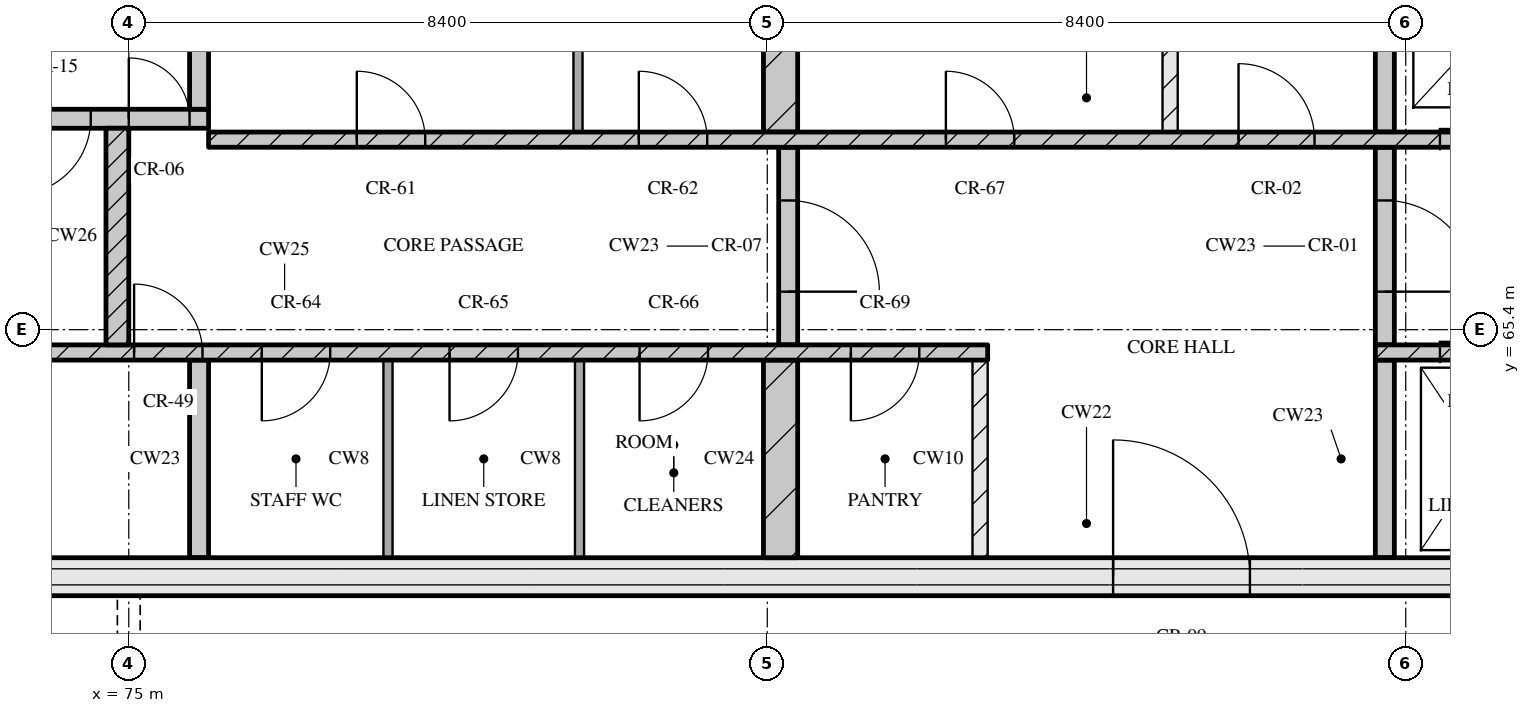
"""IFC4 building model, lengths in metres.
Left out: names, types, materials, properties, quantities, classifications, styles, units other than length and angle.
Written with IfcOpenShell. Run it as: python <this file> out.ifc"""

import sys

from ifc_helpers import new_model, si_unit, direction, frame, frame_2d, origin, place, context, subcontext, project, spatial, rectangle, extrude, element, fill, save


model = new_model("IFC4")
c1 = context("Model", 3, precision=1e-05, world=origin(), true_north=direction((0.0, 1.0)))
c2 = subcontext(c1, "Body", "Model", "MODEL_VIEW")
j1 = project(units=[si_unit("LENGTHUNIT", "METRE"), si_unit("PLANEANGLEUNIT", "RADIAN")], contexts=[c1])
p1 = place(None, origin())
s1 = spatial("IfcSite", under=j1, at=p1, CompositionType="ELEMENT")
p2 = place(p1, origin())
s2 = spatial("IfcBuilding", under=s1, at=p2, CompositionType="ELEMENT")
p3 = place(p2, frame((0.0, 0.0, 295.95)))
s3 = spatial("IfcBuildingStorey", under=s2, at=p3, CompositionType="ELEMENT", Elevation=295.95)
p4 = place(p3, frame((67.3, 62.15, 0.0), z_axis=(0.0, 0.0, 1.0), x_axis=(1.0, 0.0, 0.0)))
e1 = element("IfcWall", 1, at=p4, inside=s3, PredefinedType="SOLIDWALL", context=c2, shape_type="SweptSolid", body=[
    extrude(rectangle(XDim=40.6, YDim=0.5, at=frame_2d((20.3, 0.0))), origin(), (0.0, 0.0, 1.0), 3.32),
])
p5 = place(p4, frame((20.65, 0.0, 0.0)))
e2 = element("IfcOpeningElement", 2, at=p5, cuts=e1, PredefinedType="OPENING", context=c2, shape_type="SweptSolid", body=[
    extrude(rectangle(XDim=1.8, YDim=2.1, at=frame_2d((0.9, 1.05))), frame((0.0, 0.26, 0.0), z_axis=(0.0, -1.0, 0.0), x_axis=(1.0, 0.0, 0.0)), (0.0, 0.0, 1.0), 0.52),
])
p6 = place(p3, frame((75.925, 62.4, 0.0), z_axis=(0.0, 0.0, 1.0), x_axis=(0.0, 1.0, 0.0)))
e3 = element("IfcWall", 3, at=p6, inside=s3, PredefinedType="SOLIDWALL", context=c2, shape_type="SweptSolid", body=[
    extrude(rectangle(XDim=2.6, YDim=0.25, at=frame_2d((1.3, 0.0))), origin(), (0.0, 0.0, 1.0), 3.32),
])
for number, where, z_axis, x_axis in (
    (4, (78.41, 62.4, 0.0), (0.0, 0.0, 1.0), (0.0, 1.0, 0.0)),
    (5, (80.93, 62.4, 0.0), (0.0, 0.0, 1.0), (0.0, 1.0, 0.0)),
):
    element("IfcWall", number, at=place(p3, frame(where, z_axis=z_axis, x_axis=x_axis)), inside=s3, PredefinedType="PARTITIONING", context=c2, shape_type="SweptSolid", body=[
        extrude(rectangle(XDim=2.6, YDim=0.12, at=frame_2d((1.3, 0.0))), origin(), (0.0, 0.0, 1.0), 3.32),
    ])
p7 = place(p3, frame((83.575, 62.4, 0.0), z_axis=(0.0, 0.0, 1.0), x_axis=(0.0, 1.0, 0.0)))
e6 = element("IfcWall", 6, at=p7, inside=s3, PredefinedType="SOLIDWALL", context=c2, shape_type="SweptSolid", body=[
    extrude(rectangle(XDim=2.6, YDim=0.45, at=frame_2d((1.3, 0.0))), origin(), (0.0, 0.0, 1.0), 3.32),
])
p8 = place(p3, frame((86.2, 62.4, 0.0), z_axis=(0.0, 0.0, 1.0), x_axis=(0.0, 1.0, 0.0)))
e7 = element("IfcWall", 7, at=p8, inside=s3, PredefinedType="PARTITIONING", context=c2, shape_type="SweptSolid", body=[
    extrude(rectangle(XDim=2.6, YDim=0.2, at=frame_2d((1.3, 0.0))), origin(), (0.0, 0.0, 1.0), 3.32),
])
p9 = place(p3, frame((91.525, 62.4, 0.0), z_axis=(0.0, 0.0, 1.0), x_axis=(0.0, 1.0, 0.0)))
e8 = element("IfcWall", 8, at=p9, inside=s3, PredefinedType="SOLIDWALL", context=c2, shape_type="SweptSolid", body=[
    extrude(rectangle(XDim=2.6, YDim=0.25, at=frame_2d((1.3, 0.0))), origin(), (0.0, 0.0, 1.0), 3.32),
])
p10 = place(p3, frame((67.8, 65.1, 0.0), z_axis=(0.0, 0.0, 1.0), x_axis=(1.0, 0.0, 0.0)))
e9 = element("IfcWall", 9, at=p10, inside=s3, PredefinedType="SOLIDWALL", context=c2, shape_type="SweptSolid", body=[
    extrude(rectangle(XDim=18.5, YDim=0.2, at=frame_2d((9.25, 0.0))), origin(), (0.0, 0.0, 1.0), 3.32),
])
p11 = place(p10, frame((7.27, 0.0, 0.0)))
e10 = element("IfcOpeningElement", 10, at=p11, cuts=e9, PredefinedType="OPENING", context=c2, shape_type="SweptSolid", body=[
    extrude(rectangle(XDim=0.9, YDim=2.1, at=frame_2d((0.45, 1.05))), frame((0.0, 0.11, 0.0), z_axis=(0.0, -1.0, 0.0), x_axis=(1.0, 0.0, 0.0)), (0.0, 0.0, 1.0), 0.22),
])
p12 = place(p10, frame((8.95, 0.0, 0.0)))
e11 = element("IfcOpeningElement", 11, at=p12, cuts=e9, PredefinedType="OPENING", context=c2, shape_type="SweptSolid", body=[
    extrude(rectangle(XDim=0.9, YDim=2.1, at=frame_2d((0.45, 1.05))), frame((0.0, 0.11, 0.0), z_axis=(0.0, -1.0, 0.0), x_axis=(1.0, 0.0, 0.0)), (0.0, 0.0, 1.0), 0.22),
])
p13 = place(p10, frame((11.42, 0.0, 0.0)))
e12 = element("IfcOpeningElement", 12, at=p13, cuts=e9, PredefinedType="OPENING", context=c2, shape_type="SweptSolid", body=[
    extrude(rectangle(XDim=0.9, YDim=2.1, at=frame_2d((0.45, 1.05))), frame((0.0, 0.11, 0.0), z_axis=(0.0, -1.0, 0.0), x_axis=(1.0, 0.0, 0.0)), (0.0, 0.0, 1.0), 0.22),
])
p14 = place(p10, frame((13.92, 0.0, 0.0)))
e13 = element("IfcOpeningElement", 13, at=p14, cuts=e9, PredefinedType="OPENING", context=c2, shape_type="SweptSolid", body=[
    extrude(rectangle(XDim=0.9, YDim=2.1, at=frame_2d((0.45, 1.05))), frame((0.0, 0.11, 0.0), z_axis=(0.0, -1.0, 0.0), x_axis=(1.0, 0.0, 0.0)), (0.0, 0.0, 1.0), 0.22),
])
p15 = place(p10, frame((16.7, 0.0, 0.0)))
e14 = element("IfcOpeningElement", 14, at=p15, cuts=e9, PredefinedType="OPENING", context=c2, shape_type="SweptSolid", body=[
    extrude(rectangle(XDim=0.9, YDim=2.1, at=frame_2d((0.45, 1.05))), frame((0.0, 0.11, 0.0), z_axis=(0.0, -1.0, 0.0), x_axis=(1.0, 0.0, 0.0)), (0.0, 0.0, 1.0), 0.22),
])
p16 = place(p3, frame((91.4, 65.1, 0.0), z_axis=(0.0, 0.0, 1.0), x_axis=(1.0, 0.0, 0.0)))
e15 = element("IfcWall", 15, at=p16, inside=s3, PredefinedType="SOLIDWALL", context=c2, shape_type="SweptSolid", body=[
    extrude(rectangle(XDim=16.0, YDim=0.2, at=frame_2d((8.0, 0.0))), origin(), (0.0, 0.0, 1.0), 3.32),
])
p17 = place(p16, frame((0.85, 0.0, 0.0)))
e16 = element("IfcOpeningElement", 16, at=p17, cuts=e15, PredefinedType="OPENING", context=c2, shape_type="SweptSolid", body=[
    extrude(rectangle(XDim=1.1, YDim=2.1, at=frame_2d((0.55, 1.05))), frame((0.0, 0.11, 0.0), z_axis=(0.0, -1.0, 0.0), x_axis=(1.0, 0.0, 0.0)), (0.0, 0.0, 1.0), 0.22),
])
p18 = place(p16, frame((3.35, 0.0, 0.0)))
e17 = element("IfcOpeningElement", 17, at=p18, cuts=e15, PredefinedType="OPENING", context=c2, shape_type="SweptSolid", body=[
    extrude(rectangle(XDim=1.1, YDim=2.1, at=frame_2d((0.55, 1.05))), frame((0.0, 0.11, 0.0), z_axis=(0.0, -1.0, 0.0), x_axis=(1.0, 0.0, 0.0)), (0.0, 0.0, 1.0), 0.22),
])
p19 = place(p16, frame((5.85, 0.0, 0.0)))
e18 = element("IfcOpeningElement", 18, at=p19, cuts=e15, PredefinedType="OPENING", context=c2, shape_type="SweptSolid", body=[
    extrude(rectangle(XDim=1.1, YDim=2.1, at=frame_2d((0.55, 1.05))), frame((0.0, 0.11, 0.0), z_axis=(0.0, -1.0, 0.0), x_axis=(1.0, 0.0, 0.0)), (0.0, 0.0, 1.0), 0.22),
])
p20 = place(p16, frame((7.83, 0.0, 0.0)))
e19 = element("IfcOpeningElement", 19, at=p20, cuts=e15, PredefinedType="OPENING", context=c2, shape_type="SweptSolid", body=[
    extrude(rectangle(XDim=0.9, YDim=2.1, at=frame_2d((0.45, 1.05))), frame((0.0, 0.11, 0.0), z_axis=(0.0, -1.0, 0.0), x_axis=(1.0, 0.0, 0.0)), (0.0, 0.0, 1.0), 0.22),
])
p21 = place(p3, frame((74.85, 65.2, 0.0), z_axis=(0.0, 0.0, 1.0), x_axis=(0.0, 1.0, 0.0)))
e20 = element("IfcWall", 20, at=p21, inside=s3, PredefinedType="SOLIDWALL", context=c2, shape_type="SweptSolid", body=[
    extrude(rectangle(XDim=2.85, YDim=0.3, at=frame_2d((1.425, 0.0))), origin(), (0.0, 0.0, 1.0), 3.32),
])
p22 = place(p3, frame((83.675, 65.2, 0.0), z_axis=(0.0, 0.0, 1.0), x_axis=(0.0, 1.0, 0.0)))
e21 = element("IfcWall", 21, at=p22, inside=s3, PredefinedType="SOLIDWALL", context=c2, shape_type="SweptSolid", body=[
    extrude(rectangle(XDim=2.6, YDim=0.25, at=frame_2d((1.3, 0.0))), origin(), (0.0, 0.0, 1.0), 3.32),
])
p23 = place(p22, frame((0.7, 0.0, 0.0)))
e22 = element("IfcOpeningElement", 22, at=p23, cuts=e21, PredefinedType="OPENING", context=c2, shape_type="SweptSolid", body=[
    extrude(rectangle(XDim=1.2, YDim=2.1, at=frame_2d((0.6, 1.05))), frame((0.0, 0.135, 0.0), z_axis=(0.0, -1.0, 0.0), x_axis=(1.0, 0.0, 0.0)), (0.0, 0.0, 1.0), 0.27),
])
p24 = place(p3, frame((91.525, 65.2, 0.0), z_axis=(0.0, 0.0, 1.0), x_axis=(0.0, 1.0, 0.0)))
e23 = element("IfcWall", 23, at=p24, inside=s3, PredefinedType="SOLIDWALL", context=c2, shape_type="SweptSolid", body=[
    extrude(rectangle(XDim=2.6, YDim=0.25, at=frame_2d((1.3, 0.0))), origin(), (0.0, 0.0, 1.0), 3.32),
])
p25 = place(p24, frame((0.7, 0.0, 0.0)))
e24 = element("IfcOpeningElement", 24, at=p25, cuts=e23, PredefinedType="OPENING", context=c2, shape_type="SweptSolid", body=[
    extrude(rectangle(XDim=1.2, YDim=2.1, at=frame_2d((0.6, 1.05))), frame((0.0, 0.135, 0.0), z_axis=(0.0, -1.0, 0.0), x_axis=(1.0, 0.0, 0.0)), (0.0, 0.0, 1.0), 0.27),
])
p26 = place(p3, frame((76.05, 67.9, 0.0), z_axis=(0.0, 0.0, 1.0), x_axis=(1.0, 0.0, 0.0)))
e25 = element("IfcWall", 25, at=p26, inside=s3, PredefinedType="SOLIDWALL", context=c2, shape_type="SweptSolid", body=[
    extrude(rectangle(XDim=23.1, YDim=0.2, at=frame_2d((11.55, 0.0))), origin(), (0.0, 0.0, 1.0), 3.32),
])
p27 = place(p26, frame((1.95, 0.0, 0.0)))
e26 = element("IfcOpeningElement", 26, at=p27, cuts=e25, PredefinedType="OPENING", context=c2, shape_type="SweptSolid", body=[
    extrude(rectangle(XDim=0.9, YDim=2.1, at=frame_2d((0.45, 1.05))), frame((0.0, 0.11, 0.0), z_axis=(0.0, -1.0, 0.0), x_axis=(1.0, 0.0, 0.0)), (0.0, 0.0, 1.0), 0.22),
])
p28 = place(p26, frame((5.66, 0.0, 0.0)))
e27 = element("IfcOpeningElement", 27, at=p28, cuts=e25, PredefinedType="OPENING", context=c2, shape_type="SweptSolid", body=[
    extrude(rectangle(XDim=0.9, YDim=2.1, at=frame_2d((0.45, 1.05))), frame((0.0, 0.11, 0.0), z_axis=(0.0, -1.0, 0.0), x_axis=(1.0, 0.0, 0.0)), (0.0, 0.0, 1.0), 0.22),
])
p29 = place(p26, frame((9.7, 0.0, 0.0)))
e28 = element("IfcOpeningElement", 28, at=p29, cuts=e25, PredefinedType="OPENING", context=c2, shape_type="SweptSolid", body=[
    extrude(rectangle(XDim=0.9, YDim=2.1, at=frame_2d((0.45, 1.05))), frame((0.0, 0.11, 0.0), z_axis=(0.0, -1.0, 0.0), x_axis=(1.0, 0.0, 0.0)), (0.0, 0.0, 1.0), 0.22),
])
p30 = place(p26, frame((13.55, 0.0, 0.0)))
e29 = element("IfcOpeningElement", 29, at=p30, cuts=e25, PredefinedType="OPENING", context=c2, shape_type="SweptSolid", body=[
    extrude(rectangle(XDim=1.0, YDim=2.1, at=frame_2d((0.5, 1.05))), frame((0.0, 0.11, 0.0), z_axis=(0.0, -1.0, 0.0), x_axis=(1.0, 0.0, 0.0)), (0.0, 0.0, 1.0), 0.22),
])
p31 = place(p26, frame((16.2, 0.0, 0.0)))
e30 = element("IfcOpeningElement", 30, at=p31, cuts=e25, PredefinedType="OPENING", context=c2, shape_type="SweptSolid", body=[
    extrude(rectangle(XDim=1.1, YDim=2.1, at=frame_2d((0.55, 1.05))), frame((0.0, 0.11, 0.0), z_axis=(0.0, -1.0, 0.0), x_axis=(1.0, 0.0, 0.0)), (0.0, 0.0, 1.0), 0.22),
])
p32 = place(p26, frame((18.7, 0.0, 0.0)))
e31 = element("IfcOpeningElement", 31, at=p32, cuts=e25, PredefinedType="OPENING", context=c2, shape_type="SweptSolid", body=[
    extrude(rectangle(XDim=1.1, YDim=2.1, at=frame_2d((0.55, 1.05))), frame((0.0, 0.11, 0.0), z_axis=(0.0, -1.0, 0.0), x_axis=(1.0, 0.0, 0.0)), (0.0, 0.0, 1.0), 0.22),
])
p33 = place(p26, frame((21.2, 0.0, 0.0)))
e32 = element("IfcOpeningElement", 32, at=p33, cuts=e25, PredefinedType="OPENING", context=c2, shape_type="SweptSolid", body=[
    extrude(rectangle(XDim=1.1, YDim=2.1, at=frame_2d((0.55, 1.05))), frame((0.0, 0.11, 0.0), z_axis=(0.0, -1.0, 0.0), x_axis=(1.0, 0.0, 0.0)), (0.0, 0.0, 1.0), 0.22),
])
p34 = place(p3, frame((80.91, 68.0, 0.0), z_axis=(0.0, 0.0, 1.0), x_axis=(0.0, 1.0, 0.0)))
e33 = element("IfcWall", 33, at=p34, inside=s3, PredefinedType="PARTITIONING", context=c2, shape_type="SweptSolid", body=[
    extrude(rectangle(XDim=2.6, YDim=0.12, at=frame_2d((1.3, 0.0))), origin(), (0.0, 0.0, 1.0), 3.32),
])
p35 = place(p3, frame((83.575, 68.0, 0.0), z_axis=(0.0, 0.0, 1.0), x_axis=(0.0, 1.0, 0.0)))
e34 = element("IfcWall", 34, at=p35, inside=s3, PredefinedType="SOLIDWALL", context=c2, shape_type="SweptSolid", body=[
    extrude(rectangle(XDim=2.6, YDim=0.45, at=frame_2d((1.3, 0.0))), origin(), (0.0, 0.0, 1.0), 3.32),
])
p36 = place(p3, frame((88.7, 68.0, 0.0), z_axis=(0.0, 0.0, 1.0), x_axis=(0.0, 1.0, 0.0)))
e35 = element("IfcWall", 35, at=p36, inside=s3, PredefinedType="PARTITIONING", context=c2, shape_type="SweptSolid", body=[
    extrude(rectangle(XDim=2.6, YDim=0.2, at=frame_2d((1.3, 0.0))), origin(), (0.0, 0.0, 1.0), 3.32),
])
p37 = place(p3, frame((91.525, 68.0, 0.0), z_axis=(0.0, 0.0, 1.0), x_axis=(0.0, 1.0, 0.0)))
e36 = element("IfcWall", 36, at=p37, inside=s3, PredefinedType="SOLIDWALL", context=c2, shape_type="SweptSolid", body=[
    extrude(rectangle(XDim=2.6, YDim=0.25, at=frame_2d((1.3, 0.0))), origin(), (0.0, 0.0, 1.0), 3.32),
])
p38 = place(p3, frame((67.8, 68.175, 0.0), z_axis=(0.0, 0.0, 1.0), x_axis=(1.0, 0.0, 0.0)))
e37 = element("IfcWall", 37, at=p38, inside=s3, PredefinedType="SOLIDWALL", context=c2, shape_type="SweptSolid", body=[
    extrude(rectangle(XDim=8.25, YDim=0.25, at=frame_2d((4.125, 0.0))), origin(), (0.0, 0.0, 1.0), 3.32),
])
p39 = place(p38, frame((5.7, 0.0, 0.0)))
e38 = element("IfcOpeningElement", 38, at=p39, cuts=e37, PredefinedType="OPENING", context=c2, shape_type="SweptSolid", body=[
    extrude(rectangle(XDim=1.0, YDim=2.1, at=frame_2d((0.5, 1.05))), frame((0.0, 0.135, 0.0), z_axis=(0.0, -1.0, 0.0), x_axis=(1.0, 0.0, 0.0)), (0.0, 0.0, 1.0), 0.27),
])
p40 = place(p38, frame((7.2, 0.0, 0.0)))
e39 = element("IfcOpeningElement", 39, at=p40, cuts=e37, PredefinedType="OPENING", context=c2, shape_type="SweptSolid", body=[
    extrude(rectangle(XDim=0.8, YDim=2.1, at=frame_2d((0.4, 1.05))), frame((0.0, 0.135, 0.0), z_axis=(0.0, -1.0, 0.0), x_axis=(1.0, 0.0, 0.0)), (0.0, 0.0, 1.0), 0.27),
])
p41 = place(p3, frame((75.925, 68.3, 0.0), z_axis=(0.0, 0.0, 1.0), x_axis=(0.0, 1.0, 0.0)))
e40 = element("IfcWall", 40, at=p41, inside=s3, PredefinedType="SOLIDWALL", context=c2, shape_type="SweptSolid", body=[
    extrude(rectangle(XDim=2.3, YDim=0.25, at=frame_2d((1.15, 0.0))), origin(), (0.0, 0.0, 1.0), 3.32),
])
p42 = place(p5, origin())
e41 = element("IfcDoor", 41, at=p42, inside=s3, OperationType="DOUBLE_DOOR_SINGLE_SWING", PredefinedType="DOOR", context=c2, shape_type="SweptSolid", body=[
    extrude(rectangle(XDim=1.8, YDim=2.1, at=frame_2d((0.9, 1.05))), frame((0.0, 0.025, 0.0), z_axis=(0.0, -1.0, 0.0), x_axis=(1.0, 0.0, 0.0)), (0.0, 0.0, 1.0), 0.05),
])
fill(e2, e41)
p43 = place(p11, origin())
e42 = element("IfcDoor", 42, at=p43, inside=s3, OperationType="SINGLE_SWING_LEFT", PredefinedType="DOOR", context=c2, shape_type="SweptSolid", body=[
    extrude(rectangle(XDim=0.9, YDim=2.1, at=frame_2d((0.45, 1.05))), frame((0.0, 0.025, 0.0), z_axis=(0.0, -1.0, 0.0), x_axis=(1.0, 0.0, 0.0)), (0.0, 0.0, 1.0), 0.05),
])
fill(e10, e42)
p44 = place(p12, origin())
e43 = element("IfcDoor", 43, at=p44, inside=s3, OperationType="SINGLE_SWING_RIGHT", PredefinedType="DOOR", context=c2, shape_type="SweptSolid", body=[
    extrude(rectangle(XDim=0.9, YDim=2.1, at=frame_2d((0.45, 1.05))), frame((0.0, 0.025, 0.0), z_axis=(0.0, -1.0, 0.0), x_axis=(1.0, 0.0, 0.0)), (0.0, 0.0, 1.0), 0.05),
])
fill(e11, e43)
p45 = place(p13, origin())
e44 = element("IfcDoor", 44, at=p45, inside=s3, OperationType="SINGLE_SWING_RIGHT", PredefinedType="DOOR", context=c2, shape_type="SweptSolid", body=[
    extrude(rectangle(XDim=0.9, YDim=2.1, at=frame_2d((0.45, 1.05))), frame((0.0, 0.025, 0.0), z_axis=(0.0, -1.0, 0.0), x_axis=(1.0, 0.0, 0.0)), (0.0, 0.0, 1.0), 0.05),
])
fill(e12, e44)
p46 = place(p14, origin())
e45 = element("IfcDoor", 45, at=p46, inside=s3, OperationType="SINGLE_SWING_RIGHT", PredefinedType="DOOR", context=c2, shape_type="SweptSolid", body=[
    extrude(rectangle(XDim=0.9, YDim=2.1, at=frame_2d((0.45, 1.05))), frame((0.0, 0.025, 0.0), z_axis=(0.0, -1.0, 0.0), x_axis=(1.0, 0.0, 0.0)), (0.0, 0.0, 1.0), 0.05),
])
fill(e13, e45)
p47 = place(p15, origin())
e46 = element("IfcDoor", 46, at=p47, inside=s3, OperationType="SINGLE_SWING_RIGHT", PredefinedType="DOOR", context=c2, shape_type="SweptSolid", body=[
    extrude(rectangle(XDim=0.9, YDim=2.1, at=frame_2d((0.45, 1.05))), frame((0.0, 0.025, 0.0), z_axis=(0.0, -1.0, 0.0), x_axis=(1.0, 0.0, 0.0)), (0.0, 0.0, 1.0), 0.05),
])
fill(e14, e46)
p48 = place(p17, origin())
e47 = element("IfcDoor", 47, at=p48, inside=s3, OperationType="SLIDING_TO_LEFT", PredefinedType="DOOR", context=c2, shape_type="SweptSolid", body=[
    extrude(rectangle(XDim=1.1, YDim=2.1, at=frame_2d((0.55, 1.05))), frame((0.0, 0.025, 0.0), z_axis=(0.0, -1.0, 0.0), x_axis=(1.0, 0.0, 0.0)), (0.0, 0.0, 1.0), 0.05),
])
fill(e16, e47)
p49 = place(p23, origin())
e48 = element("IfcDoor", 48, at=p49, inside=s3, OperationType="SINGLE_SWING_RIGHT", PredefinedType="DOOR", context=c2, shape_type="SweptSolid", body=[
    extrude(rectangle(XDim=1.2, YDim=2.1, at=frame_2d((0.6, 1.05))), frame((0.0, 0.025, 0.0), z_axis=(0.0, -1.0, 0.0), x_axis=(1.0, 0.0, 0.0)), (0.0, 0.0, 1.0), 0.05),
])
fill(e22, e48)
p50 = place(p25, origin())
e49 = element("IfcDoor", 49, at=p50, inside=s3, OperationType="SINGLE_SWING_RIGHT", PredefinedType="DOOR", context=c2, shape_type="SweptSolid", body=[
    extrude(rectangle(XDim=1.2, YDim=2.1, at=frame_2d((0.6, 1.05))), frame((0.0, 0.025, 0.0), z_axis=(0.0, -1.0, 0.0), x_axis=(1.0, 0.0, 0.0)), (0.0, 0.0, 1.0), 0.05),
])
fill(e24, e49)
p51 = place(p27, origin())
e50 = element("IfcDoor", 50, at=p51, inside=s3, OperationType="SINGLE_SWING_LEFT", PredefinedType="DOOR", context=c2, shape_type="SweptSolid", body=[
    extrude(rectangle(XDim=0.9, YDim=2.1, at=frame_2d((0.45, 1.05))), frame((0.0, 0.025, 0.0), z_axis=(0.0, -1.0, 0.0), x_axis=(1.0, 0.0, 0.0)), (0.0, 0.0, 1.0), 0.05),
])
fill(e26, e50)
p52 = place(p28, origin())
e51 = element("IfcDoor", 51, at=p52, inside=s3, OperationType="SINGLE_SWING_LEFT", PredefinedType="DOOR", context=c2, shape_type="SweptSolid", body=[
    extrude(rectangle(XDim=0.9, YDim=2.1, at=frame_2d((0.45, 1.05))), frame((0.0, 0.025, 0.0), z_axis=(0.0, -1.0, 0.0), x_axis=(1.0, 0.0, 0.0)), (0.0, 0.0, 1.0), 0.05),
])
fill(e27, e51)
p53 = place(p29, origin())
e52 = element("IfcDoor", 52, at=p53, inside=s3, OperationType="SINGLE_SWING_LEFT", PredefinedType="DOOR", context=c2, shape_type="SweptSolid", body=[
    extrude(rectangle(XDim=0.9, YDim=2.1, at=frame_2d((0.45, 1.05))), frame((0.0, 0.025, 0.0), z_axis=(0.0, -1.0, 0.0), x_axis=(1.0, 0.0, 0.0)), (0.0, 0.0, 1.0), 0.05),
])
fill(e28, e52)
p54 = place(p30, origin())
e53 = element("IfcDoor", 53, at=p54, inside=s3, OperationType="SINGLE_SWING_LEFT", PredefinedType="DOOR", context=c2, shape_type="SweptSolid", body=[
    extrude(rectangle(XDim=1.0, YDim=2.1, at=frame_2d((0.5, 1.05))), frame((0.0, 0.025, 0.0), z_axis=(0.0, -1.0, 0.0), x_axis=(1.0, 0.0, 0.0)), (0.0, 0.0, 1.0), 0.05),
])
fill(e29, e53)
p55 = place(p31, origin())
e54 = element("IfcDoor", 54, at=p55, inside=s3, OperationType="SLIDING_TO_RIGHT", PredefinedType="DOOR", context=c2, shape_type="SweptSolid", body=[
    extrude(rectangle(XDim=1.1, YDim=2.1, at=frame_2d((0.55, 1.05))), frame((0.0, 0.025, 0.0), z_axis=(0.0, -1.0, 0.0), x_axis=(1.0, 0.0, 0.0)), (0.0, 0.0, 1.0), 0.05),
])
fill(e30, e54)
p56 = place(p39, origin())
e55 = element("IfcDoor", 55, at=p56, inside=s3, OperationType="SINGLE_SWING_RIGHT", PredefinedType="DOOR", context=c2, shape_type="SweptSolid", body=[
    extrude(rectangle(XDim=1.0, YDim=2.1, at=frame_2d((0.5, 1.05))), frame((0.0, 0.025, 0.0), z_axis=(0.0, -1.0, 0.0), x_axis=(1.0, 0.0, 0.0)), (0.0, 0.0, 1.0), 0.05),
])
fill(e38, e55)
p57 = place(p40, origin())
e56 = element("IfcDoor", 56, at=p57, inside=s3, OperationType="SINGLE_SWING_LEFT", PredefinedType="DOOR", context=c2, shape_type="SweptSolid", body=[
    extrude(rectangle(XDim=0.8, YDim=2.1, at=frame_2d((0.4, 1.05))), frame((0.0, 0.025, 0.0), z_axis=(0.0, -1.0, 0.0), x_axis=(1.0, 0.0, 0.0)), (0.0, 0.0, 1.0), 0.05),
])
fill(e39, e56)
save(model, sys.argv[1])
